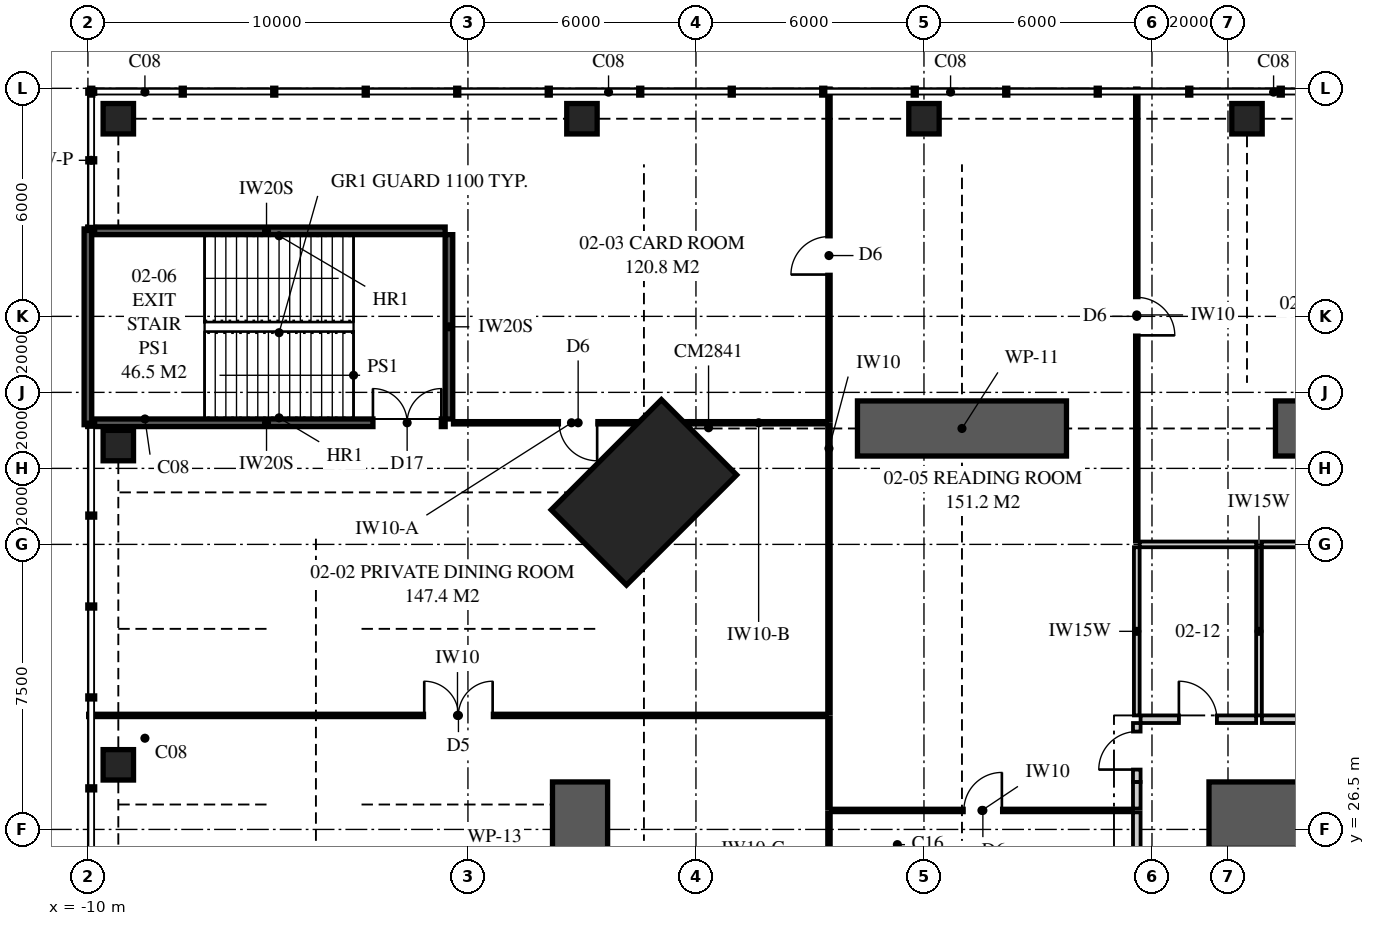
"""IFC4 building model, lengths in metres.
Left out: names, types, materials, properties, quantities, classifications, styles, units other than length and angle.
Written with IfcOpenShell. Run it as: python <this file> out.ifc"""

import sys

from ifc_helpers import new_model, si_unit, direction, frame, frame_2d, origin, origin_2d, place, context, subcontext, project, spatial, polyline, rectangle, outline, extrude, element, fill, save


model = new_model("IFC4")
c1 = context("Model", 3, precision=1e-05, world=origin(), true_north=direction((0.0, 1.0)))
c2 = subcontext(c1, "Body", "Model", "MODEL_VIEW")
j1 = project(units=[si_unit("LENGTHUNIT", "METRE"), si_unit("PLANEANGLEUNIT", "RADIAN")], contexts=[c1])
p1 = place(None, origin())
s1 = spatial("IfcSite", under=j1, at=p1, CompositionType="ELEMENT")
p2 = place(p1, origin())
s2 = spatial("IfcBuilding", under=s1, at=p2, CompositionType="ELEMENT")
p3 = place(p2, frame((0.0, 0.0, 11.0)))
s3 = spatial("IfcBuildingStorey", under=s2, at=p3, CompositionType="ELEMENT", Elevation=11.0)
p4 = place(p3, frame((4.631, 35.369, 0.0), z_axis=(0.0, 0.0, 1.0), x_axis=(0.707106781187, -0.707106781187, 0.0)))
e1 = element("IfcColumn", 1, at=p4, inside=s3, PredefinedType="COLUMN", context=c2, shape_type="SweptSolid", body=[
    extrude(rectangle(XDim=2.8, YDim=4.1, at=origin_2d()), origin(), (0.0, 0.0, 1.0), 5.0),
])
for number, where, z_axis, x_axis in (
    (2, (-9.2, 28.2, 0.0), (0.0, 0.0, 1.0), (1.0, 0.0, 0.0)),
    (3, (-9.2, 36.6, 0.0), (0.0, 0.0, 1.0), (1.0, 0.0, 0.0)),
    (4, (-9.2, 45.2, 0.0), (0.0, 0.0, 1.0), (1.0, 0.0, 0.0)),
    (5, (3.0, 45.2, 0.0), (0.0, 0.0, 1.0), (1.0, 0.0, 0.0)),
    (6, (12.0, 45.2, 0.0), (0.0, 0.0, 1.0), (1.0, 0.0, 0.0)),
    (7, (20.5, 45.2, 0.0), (0.0, 0.0, 1.0), (1.0, 0.0, 0.0)),
):
    element("IfcColumn", number, at=place(p3, frame(where, z_axis=z_axis, x_axis=x_axis)), inside=s3, PredefinedType="COLUMN", context=c2, shape_type="SweptSolid", body=[
        extrude(rectangle(XDim=0.8, YDim=0.8, at=origin_2d()), origin(), (0.0, 0.0, 1.0), 5.0),
    ])
p5 = place(p3, frame((26.0, 26.875, 0.0), z_axis=(0.0, 0.0, 1.0), x_axis=(-1.0, 0.0, 0.0)))
e8 = element("IfcWall", 8, at=p5, inside=s3, PredefinedType="SHEAR", context=c2, shape_type="SweptSolid", body=[
    extrude(rectangle(XDim=6.5, YDim=1.75, at=frame_2d((3.25, 0.0))), origin(), (0.0, 0.0, 1.0), 5.0),
])
p6 = place(p5, frame((0.825, 0.0, 0.0)))
e9 = element("IfcOpeningElement", 9, at=p6, cuts=e8, PredefinedType="OPENING", context=c2, shape_type="SweptSolid", body=[
    extrude(rectangle(XDim=0.75, YDim=2.1, at=frame_2d((0.375, 1.05))), frame((0.0, 0.885, 0.0), z_axis=(0.0, -1.0, 0.0), x_axis=(1.0, 0.0, 0.0)), (0.0, 0.0, 1.0), 1.77),
])
p7 = place(p3, frame((-10.0, 42.3, 0.0), z_axis=(0.0, 0.0, 1.0), x_axis=(0.0, -1.0, 0.0)))
e10 = element("IfcWall", 10, at=p7, inside=s3, PredefinedType="SOLIDWALL", context=c2, shape_type="SweptSolid", body=[
    extrude(rectangle(XDim=5.15, YDim=0.2, at=frame_2d((2.575, 0.0))), origin(), (0.0, 0.0, 1.0), 5.0),
])
p8 = place(p3, frame((-10.0, 29.5, 0.0), z_axis=(0.0, 0.0, 1.0), x_axis=(1.0, 0.0, 0.0)))
e11 = element("IfcWall", 11, at=p8, inside=s3, PredefinedType="PARTITIONING", context=c2, shape_type="SweptSolid", body=[
    extrude(outline(polyline([(0.0, 0.0), (19.45, 0.0), (19.45, 4.72), (15.891, 4.72), (15.891, 4.02), (13.371, 4.02), (13.371, 4.72), (7.26, 4.72), (7.26, 4.02), (4.74, 4.02), (4.74, 4.72), (1.16, 4.72), (1.16, 3.52), (0.44, 3.52), (0.44, 4.72), (0.0, 4.72), (0.0, 0.0)])), frame((0.0, 0.05, 0.0), z_axis=(0.0, -1.0, 0.0), x_axis=(1.0, 0.0, 0.0)), (0.0, 0.0, 1.0), 0.1),
])
p9 = place(p8, frame((8.85, 0.0, 0.0)))
e12 = element("IfcOpeningElement", 12, at=p9, cuts=e11, PredefinedType="OPENING", context=c2, shape_type="SweptSolid", body=[
    extrude(rectangle(XDim=1.8, YDim=2.1, at=frame_2d((0.9, 1.05))), frame((0.0, 0.06, 0.0), z_axis=(0.0, -1.0, 0.0), x_axis=(1.0, 0.0, 0.0)), (0.0, 0.0, 1.0), 0.12),
])
p10 = place(p3, frame((9.5, 25.0, 0.0), z_axis=(0.0, 0.0, 1.0), x_axis=(0.0, 1.0, 0.0)))
e13 = element("IfcWall", 13, at=p10, inside=s3, PredefinedType="PARTITIONING", context=c2, shape_type="SweptSolid", body=[
    extrude(outline(polyline([(0.0, 0.0), (1.95, 0.0), (1.95, 4.72), (1.26, 4.72), (1.26, 4.02), (0.0, 4.02), (0.0, 0.0)])), frame((0.0, 0.05, 0.0), z_axis=(0.0, -1.0, 0.0), x_axis=(1.0, 0.0, 0.0)), (0.0, 0.0, 1.0), 0.1),
])
p11 = place(p3, frame((9.5, 27.05, 0.0), z_axis=(0.0, 0.0, 1.0), x_axis=(0.0, 1.0, 0.0)))
e14 = element("IfcWall", 14, at=p11, inside=s3, PredefinedType="PARTITIONING", context=c2, shape_type="SweptSolid", body=[
    extrude(rectangle(XDim=2.4, YDim=0.1, at=frame_2d((1.2, 0.0))), origin(), (0.0, 0.0, 1.0), 4.72),
])
p12 = place(p3, frame((-0.4, 37.2, 0.0), z_axis=(0.0, 0.0, 1.0), x_axis=(1.0, 0.0, 0.0)))
e15 = element("IfcWall", 15, at=p12, inside=s3, PredefinedType="PARTITIONING", context=c2, shape_type="SweptSolid", body=[
    extrude(outline(polyline([(0.0, 0.0), (6.249, 0.0), (6.249, 4.02), (3.771, 4.02), (3.771, 4.72), (0.0, 4.72), (0.0, 0.0)])), frame((0.0, 0.05, 0.0), z_axis=(0.0, -1.0, 0.0), x_axis=(1.0, 0.0, 0.0)), (0.0, 0.0, 1.0), 0.1),
])
p13 = place(p12, frame((2.8, 0.0, 0.0)))
e16 = element("IfcOpeningElement", 16, at=p13, cuts=e15, PredefinedType="OPENING", context=c2, shape_type="SweptSolid", body=[
    extrude(rectangle(XDim=1.0, YDim=2.1, at=frame_2d((0.5, 1.05))), frame((0.0, 0.06, 0.0), z_axis=(0.0, -1.0, 0.0), x_axis=(1.0, 0.0, 0.0)), (0.0, 0.0, 1.0), 0.12),
])
p14 = place(p3, frame((5.849, 37.2, 0.0), z_axis=(0.0, 0.0, 1.0), x_axis=(1.0, 0.0, 0.0)))
e17 = element("IfcWall", 17, at=p14, inside=s3, PredefinedType="PARTITIONING", context=c2, shape_type="SweptSolid", body=[
    extrude(rectangle(XDim=3.601, YDim=0.1, at=frame_2d((1.8, 0.0))), origin(), (0.0, 0.0, 1.0), 3.82),
])
p15 = place(p3, frame((9.5, 29.55, 0.0), z_axis=(0.0, 0.0, 1.0), x_axis=(0.0, 1.0, 0.0)))
e18 = element("IfcWall", 18, at=p15, inside=s3, PredefinedType="PARTITIONING", context=c2, shape_type="SweptSolid", body=[
    extrude(outline(polyline([(0.0, 0.0), (7.6, 0.0), (7.6, 4.72), (7.6, 3.82), (6.24, 3.82), (6.24, 4.72), (0.0, 4.72), (0.0, 0.0)])), frame((0.0, 0.05, 0.0), z_axis=(0.0, -1.0, 0.0), x_axis=(1.0, 0.0, 0.0)), (0.0, 0.0, 1.0), 0.1),
])
p16 = place(p3, frame((-10.0, 37.2, 0.0), z_axis=(0.0, 0.0, 1.0), x_axis=(1.0, 0.0, 0.0)))
e19 = element("IfcWall", 19, at=p16, inside=s3, PredefinedType="SOLIDWALL", context=c2, shape_type="SweptSolid", body=[
    extrude(rectangle(XDim=9.4, YDim=0.2, at=frame_2d((4.7, 0.0))), origin(), (0.0, 0.0, 1.0), 5.0),
])
p17 = place(p16, frame((7.5, 0.0, 0.0)))
e20 = element("IfcOpeningElement", 20, at=p17, cuts=e19, PredefinedType="OPENING", context=c2, shape_type="SweptSolid", body=[
    extrude(rectangle(XDim=1.8, YDim=2.2, at=frame_2d((0.9, 1.1))), frame((0.0, 0.11, 0.0), z_axis=(0.0, -1.0, 0.0), x_axis=(1.0, 0.0, 0.0)), (0.0, 0.0, 1.0), 0.22),
])
p18 = place(p3, frame((9.5, 37.25, 0.0), z_axis=(0.0, 0.0, 1.0), x_axis=(0.0, 1.0, 0.0)))
e21 = element("IfcWall", 21, at=p18, inside=s3, PredefinedType="PARTITIONING", context=c2, shape_type="SweptSolid", body=[
    extrude(outline(polyline([(0.0, 0.0), (8.75, 0.0), (8.75, 4.72), (8.75, 4.02), (6.69, 4.02), (6.69, 4.72), (1.06, 4.72), (1.06, 3.82), (0.0, 3.82), (0.0, 4.72), (0.0, 0.0)])), frame((0.0, 0.05, 0.0), z_axis=(0.0, -1.0, 0.0), x_axis=(1.0, 0.0, 0.0)), (0.0, 0.0, 1.0), 0.1),
])
p19 = place(p18, frame((3.85, 0.0, 0.0)))
e22 = element("IfcOpeningElement", 22, at=p19, cuts=e21, PredefinedType="OPENING", context=c2, shape_type="SweptSolid", body=[
    extrude(rectangle(XDim=1.0, YDim=2.1, at=frame_2d((0.5, 1.05))), frame((0.0, 0.06, 0.0), z_axis=(0.0, -1.0, 0.0), x_axis=(1.0, 0.0, 0.0)), (0.0, 0.0, 1.0), 0.12),
])
p20 = place(p3, frame((-0.5, 37.3, 0.0), z_axis=(0.0, 0.0, 1.0), x_axis=(0.0, 1.0, 0.0)))
e23 = element("IfcWall", 23, at=p20, inside=s3, PredefinedType="SOLIDWALL", context=c2, shape_type="SweptSolid", body=[
    extrude(rectangle(XDim=4.85, YDim=0.2, at=frame_2d((2.425, 0.0))), origin(), (0.0, 0.0, 1.0), 5.0),
])
p21 = place(p3, frame((-10.0, 42.25, 0.0), z_axis=(0.0, 0.0, 1.0), x_axis=(1.0, 0.0, 0.0)))
e24 = element("IfcWall", 24, at=p21, inside=s3, PredefinedType="SOLIDWALL", context=c2, shape_type="SweptSolid", body=[
    extrude(rectangle(XDim=9.4, YDim=0.2, at=frame_2d((4.7, 0.0))), origin(), (0.0, 0.0, 1.0), 5.0),
])
p22 = place(p3, frame((9.55, 27.0, 0.0), z_axis=(0.0, 0.0, 1.0), x_axis=(1.0, 0.0, 0.0)))
e25 = element("IfcWall", 25, at=p22, inside=s3, PredefinedType="PARTITIONING", context=c2, shape_type="SweptSolid", body=[
    extrude(outline(polyline([(0.0, 0.0), (7.95, 0.0), (7.95, 4.72), (4.71, 4.72), (4.71, 4.02), (2.19, 4.02), (2.19, 4.72), (0.0, 4.72), (0.0, 0.0)])), frame((0.0, 0.05, 0.0), z_axis=(0.0, -1.0, 0.0), x_axis=(1.0, 0.0, 0.0)), (0.0, 0.0, 1.0), 0.1),
])
p23 = place(p22, frame((3.5, 0.0, 0.0)))
e26 = element("IfcOpeningElement", 26, at=p23, cuts=e25, PredefinedType="OPENING", context=c2, shape_type="SweptSolid", body=[
    extrude(rectangle(XDim=1.0, YDim=2.1, at=frame_2d((0.5, 1.05))), frame((0.0, 0.06, 0.0), z_axis=(0.0, -1.0, 0.0), x_axis=(1.0, 0.0, 0.0)), (0.0, 0.0, 1.0), 0.12),
])
p24 = place(p3, frame((17.6, 9.25, 0.0), z_axis=(0.0, 0.0, 1.0), x_axis=(0.0, 1.0, 0.0)))
e27 = element("IfcWall", 27, at=p24, inside=s3, PredefinedType="PARTITIONING", context=c2, shape_type="SweptSolid", body=[
    extrude(outline(polyline([(0.0, 0.0), (17.7, 0.0), (17.7, 4.72), (17.06, 4.72), (17.06, 4.02), (14.44, 4.02), (14.44, 4.72), (5.06, 4.72), (5.06, 4.02), (2.44, 4.02), (2.44, 4.72), (0.0, 4.72), (0.0, 0.0)])), frame((0.0, 0.1, 0.0), z_axis=(0.0, -1.0, 0.0), x_axis=(1.0, 0.0, 0.0)), (0.0, 0.0, 1.0), 0.2),
])
p25 = place(p24, frame((7.975, 0.0, 0.0)))
e28 = element("IfcOpeningElement", 28, at=p25, cuts=e27, PredefinedType="OPENING", context=c2, shape_type="SweptSolid", body=[
    extrude(rectangle(XDim=1.8, YDim=2.1, at=frame_2d((0.9, 1.05))), frame((0.0, 0.11, 0.0), z_axis=(0.0, -1.0, 0.0), x_axis=(1.0, 0.0, 0.0)), (0.0, 0.0, 1.0), 0.22),
])
p26 = place(p3, frame((17.6, 27.75, 0.0), z_axis=(0.0, 0.0, 1.0), x_axis=(0.0, 1.0, 0.0)))
e29 = element("IfcWall", 29, at=p26, inside=s3, PredefinedType="PARTITIONING", context=c2, shape_type="SweptSolid", body=[
    extrude(rectangle(XDim=1.55, YDim=0.2, at=frame_2d((0.775, 0.0))), origin(), (0.0, 0.0, 1.0), 4.72),
])
p27 = place(p26, frame((0.325, 0.0, 0.0)))
e30 = element("IfcOpeningElement", 30, at=p27, cuts=e29, PredefinedType="OPENING", context=c2, shape_type="SweptSolid", body=[
    extrude(rectangle(XDim=1.0, YDim=2.1, at=frame_2d((0.5, 1.05))), frame((0.0, 0.11, 0.0), z_axis=(0.0, -1.0, 0.0), x_axis=(1.0, 0.0, 0.0)), (0.0, 0.0, 1.0), 0.22),
])
p28 = place(p3, frame((17.6, 27.05, 0.0), z_axis=(0.0, 0.0, 1.0), x_axis=(0.0, 1.0, 0.0)))
e31 = element("IfcWall", 31, at=p28, inside=s3, PredefinedType="PARTITIONING", context=c2, shape_type="SweptSolid", body=[
    extrude(rectangle(XDim=0.7, YDim=0.2, at=frame_2d((0.35, 0.0))), origin(), (0.0, 0.0, 1.0), 4.72),
])
p29 = place(p3, frame((17.6, 29.5, 0.0), z_axis=(0.0, 0.0, 1.0), x_axis=(0.0, 1.0, 0.0)))
e32 = element("IfcWall", 32, at=p29, inside=s3, PredefinedType="PLUMBINGWALL", context=c2, shape_type="SweptSolid", body=[
    extrude(rectangle(XDim=4.425, YDim=0.15, at=frame_2d((2.212, 0.0))), origin(), (0.0, 0.0, 1.0), 4.72),
])
p30 = place(p3, frame((17.6, 34.075, 0.0), z_axis=(0.0, 0.0, 1.0), x_axis=(0.0, 1.0, 0.0)))
e33 = element("IfcWall", 33, at=p30, inside=s3, PredefinedType="PARTITIONING", context=c2, shape_type="SweptSolid", body=[
    extrude(outline(polyline([(0.0, 0.0), (11.925, 0.0), (11.925, 4.72), (11.925, 4.02), (9.865, 4.02), (9.865, 4.72), (4.235, 4.72), (4.235, 4.02), (1.715, 4.02), (1.715, 4.72), (0.0, 4.72), (0.0, 0.0)])), frame((0.0, 0.05, 0.0), z_axis=(0.0, -1.0, 0.0), x_axis=(1.0, 0.0, 0.0)), (0.0, 0.0, 1.0), 0.1),
])
p31 = place(p30, frame((5.425, 0.0, 0.0)))
e34 = element("IfcOpeningElement", 34, at=p31, cuts=e33, PredefinedType="OPENING", context=c2, shape_type="SweptSolid", body=[
    extrude(rectangle(XDim=1.0, YDim=2.1, at=frame_2d((0.5, 1.05))), frame((0.0, 0.06, 0.0), z_axis=(0.0, -1.0, 0.0), x_axis=(1.0, 0.0, 0.0)), (0.0, 0.0, 1.0), 0.12),
])
p32 = place(p3, frame((17.7, 29.4, 0.0), z_axis=(0.0, 0.0, 1.0), x_axis=(1.0, 0.0, 0.0)))
e35 = element("IfcWall", 35, at=p32, inside=s3, PredefinedType="PARTITIONING", context=c2, shape_type="SweptSolid", body=[
    extrude(rectangle(XDim=3.041, YDim=0.2, at=frame_2d((1.521, 0.0))), origin(), (0.0, 0.0, 1.0), 4.72),
])
p33 = place(p32, frame((1.008, 0.0, 0.0)))
e36 = element("IfcOpeningElement", 36, at=p33, cuts=e35, PredefinedType="OPENING", context=c2, shape_type="SweptSolid", body=[
    extrude(rectangle(XDim=1.0, YDim=2.1, at=frame_2d((0.5, 1.05))), frame((0.0, 0.11, 0.0), z_axis=(0.0, -1.0, 0.0), x_axis=(1.0, 0.0, 0.0)), (0.0, 0.0, 1.0), 0.22),
])
p34 = place(p3, frame((20.891, 29.4, 0.0), z_axis=(0.0, 0.0, 1.0), x_axis=(1.0, 0.0, 0.0)))
e37 = element("IfcWall", 37, at=p34, inside=s3, PredefinedType="PARTITIONING", context=c2, shape_type="SweptSolid", body=[
    extrude(outline(polyline([(0.0, 0.0), (4.942, 0.0), (4.942, 4.72), (4.419, 4.72), (4.419, 4.02), (1.799, 4.02), (1.799, 4.72), (0.0, 4.72), (0.0, 0.0)])), frame((0.0, 0.1, 0.0), z_axis=(0.0, -1.0, 0.0), x_axis=(1.0, 0.0, 0.0)), (0.0, 0.0, 1.0), 0.2),
])
p35 = place(p34, frame((2.021, 0.0, 0.0)))
e38 = element("IfcOpeningElement", 38, at=p35, cuts=e37, PredefinedType="OPENING", context=c2, shape_type="SweptSolid", body=[
    extrude(rectangle(XDim=0.9, YDim=2.1, at=frame_2d((0.45, 1.05))), frame((0.0, 0.11, 0.0), z_axis=(0.0, -1.0, 0.0), x_axis=(1.0, 0.0, 0.0)), (0.0, 0.0, 1.0), 0.22),
])
p36 = place(p3, frame((20.816, 29.5, 0.0), z_axis=(0.0, 0.0, 1.0), x_axis=(0.0, 1.0, 0.0)))
e39 = element("IfcWall", 39, at=p36, inside=s3, PredefinedType="PLUMBINGWALL", context=c2, shape_type="SweptSolid", body=[
    extrude(rectangle(XDim=4.425, YDim=0.15, at=frame_2d((2.212, 0.0))), origin(), (0.0, 0.0, 1.0), 4.72),
])
p37 = place(p3, frame((17.675, 34.0, 0.0), z_axis=(0.0, 0.0, 1.0), x_axis=(1.0, 0.0, 0.0)))
e40 = element("IfcWall", 40, at=p37, inside=s3, PredefinedType="PLUMBINGWALL", context=c2, shape_type="SweptSolid", body=[
    extrude(rectangle(XDim=3.066, YDim=0.15, at=frame_2d((1.533, 0.0))), origin(), (0.0, 0.0, 1.0), 4.72),
])
p38 = place(p3, frame((20.891, 34.0, 0.0), z_axis=(0.0, 0.0, 1.0), x_axis=(1.0, 0.0, 0.0)))
e41 = element("IfcWall", 41, at=p38, inside=s3, PredefinedType="PLUMBINGWALL", context=c2, shape_type="SweptSolid", body=[
    extrude(outline(polyline([(0.0, 0.0), (4.942, 0.0), (4.942, 4.72), (4.394, 4.72), (4.394, 4.02), (1.824, 4.02), (1.824, 4.72), (0.0, 4.72), (0.0, 0.0)])), frame((0.0, 0.075, 0.0), z_axis=(0.0, -1.0, 0.0), x_axis=(1.0, 0.0, 0.0)), (0.0, 0.0, 1.0), 0.15),
])
for number, where, z_axis, x_axis in (
    (42, (21.25, 37.05, 0.0), (0.0, 0.0, 1.0), (1.0, 0.0, 0.0)),
    (43, (10.25, 37.05, 0.0), (0.0, 0.0, 1.0), (1.0, 0.0, 0.0)),
    (44, (2.95, 22.25, 0.0), (0.0, 0.0, 1.0), (0.0, 1.0, 0.0)),
):
    element("IfcWall", number, at=place(p3, frame(where, z_axis=z_axis, x_axis=x_axis)), inside=s3, PredefinedType="SHEAR", context=c2, shape_type="SweptSolid", body=[
        extrude(rectangle(XDim=5.5, YDim=1.45, at=frame_2d((2.75, 0.0))), origin(), (0.0, 0.0, 1.0), 5.0),
    ])
p39 = place(p9, origin())
e45 = element("IfcDoor", 45, at=p39, inside=s3, OperationType="DOUBLE_DOOR_SINGLE_SWING", PredefinedType="DOOR", context=c2, shape_type="SweptSolid", body=[
    extrude(rectangle(XDim=1.8, YDim=2.1, at=frame_2d((0.9, 1.05))), frame((0.0, 0.025, 0.0), z_axis=(0.0, -1.0, 0.0), x_axis=(1.0, 0.0, 0.0)), (0.0, 0.0, 1.0), 0.05),
])
fill(e12, e45)
p40 = place(p13, frame((1.0, 0.0, 0.0), z_axis=(0.0, 0.0, 1.0), x_axis=(-1.0, 0.0, 0.0)))
e46 = element("IfcDoor", 46, at=p40, inside=s3, OperationType="SINGLE_SWING_LEFT", PredefinedType="DOOR", context=c2, shape_type="SweptSolid", body=[
    extrude(rectangle(XDim=1.0, YDim=2.1, at=frame_2d((0.5, 1.05))), frame((0.0, 0.025, 0.0), z_axis=(0.0, -1.0, 0.0), x_axis=(1.0, 0.0, 0.0)), (0.0, 0.0, 1.0), 0.05),
])
fill(e16, e46)
p41 = place(p17, origin())
e47 = element("IfcDoor", 47, at=p41, inside=s3, OperationType="DOUBLE_DOOR_SINGLE_SWING", PredefinedType="DOOR", context=c2, shape_type="SweptSolid", body=[
    extrude(rectangle(XDim=1.8, YDim=2.2, at=frame_2d((0.9, 1.1))), frame((0.0, 0.025, 0.0), z_axis=(0.0, -1.0, 0.0), x_axis=(1.0, 0.0, 0.0)), (0.0, 0.0, 1.0), 0.05),
])
fill(e20, e47)
p42 = place(p19, origin())
e48 = element("IfcDoor", 48, at=p42, inside=s3, OperationType="SINGLE_SWING_LEFT", PredefinedType="DOOR", context=c2, shape_type="SweptSolid", body=[
    extrude(rectangle(XDim=1.0, YDim=2.1, at=frame_2d((0.5, 1.05))), frame((0.0, 0.025, 0.0), z_axis=(0.0, -1.0, 0.0), x_axis=(1.0, 0.0, 0.0)), (0.0, 0.0, 1.0), 0.05),
])
fill(e22, e48)
p43 = place(p27, origin())
e49 = element("IfcDoor", 49, at=p43, inside=s3, OperationType="SINGLE_SWING_LEFT", PredefinedType="DOOR", context=c2, shape_type="SweptSolid", body=[
    extrude(rectangle(XDim=1.0, YDim=2.1, at=frame_2d((0.5, 1.05))), frame((0.0, 0.025, 0.0), z_axis=(0.0, -1.0, 0.0), x_axis=(1.0, 0.0, 0.0)), (0.0, 0.0, 1.0), 0.05),
])
fill(e30, e49)
p44 = place(p23, origin())
e50 = element("IfcDoor", 50, at=p44, inside=s3, OperationType="SINGLE_SWING_RIGHT", PredefinedType="DOOR", context=c2, shape_type="SweptSolid", body=[
    extrude(rectangle(XDim=1.0, YDim=2.1, at=frame_2d((0.5, 1.05))), frame((0.0, 0.025, 0.0), z_axis=(0.0, -1.0, 0.0), x_axis=(1.0, 0.0, 0.0)), (0.0, 0.0, 1.0), 0.05),
])
fill(e26, e50)
p45 = place(p33, origin())
e51 = element("IfcDoor", 51, at=p45, inside=s3, OperationType="SINGLE_SWING_LEFT", PredefinedType="DOOR", context=c2, shape_type="SweptSolid", body=[
    extrude(rectangle(XDim=1.0, YDim=2.1, at=frame_2d((0.5, 1.05))), frame((0.0, 0.025, 0.0), z_axis=(0.0, -1.0, 0.0), x_axis=(1.0, 0.0, 0.0)), (0.0, 0.0, 1.0), 0.05),
])
fill(e36, e51)
p46 = place(p31, frame((1.0, 0.0, 0.0), z_axis=(0.0, 0.0, 1.0), x_axis=(-1.0, 0.0, 0.0)))
e52 = element("IfcDoor", 52, at=p46, inside=s3, OperationType="SINGLE_SWING_RIGHT", PredefinedType="DOOR", context=c2, shape_type="SweptSolid", body=[
    extrude(rectangle(XDim=1.0, YDim=2.1, at=frame_2d((0.5, 1.05))), frame((0.0, 0.025, 0.0), z_axis=(0.0, -1.0, 0.0), x_axis=(1.0, 0.0, 0.0)), (0.0, 0.0, 1.0), 0.05),
])
fill(e34, e52)
save(model, sys.argv[1])
